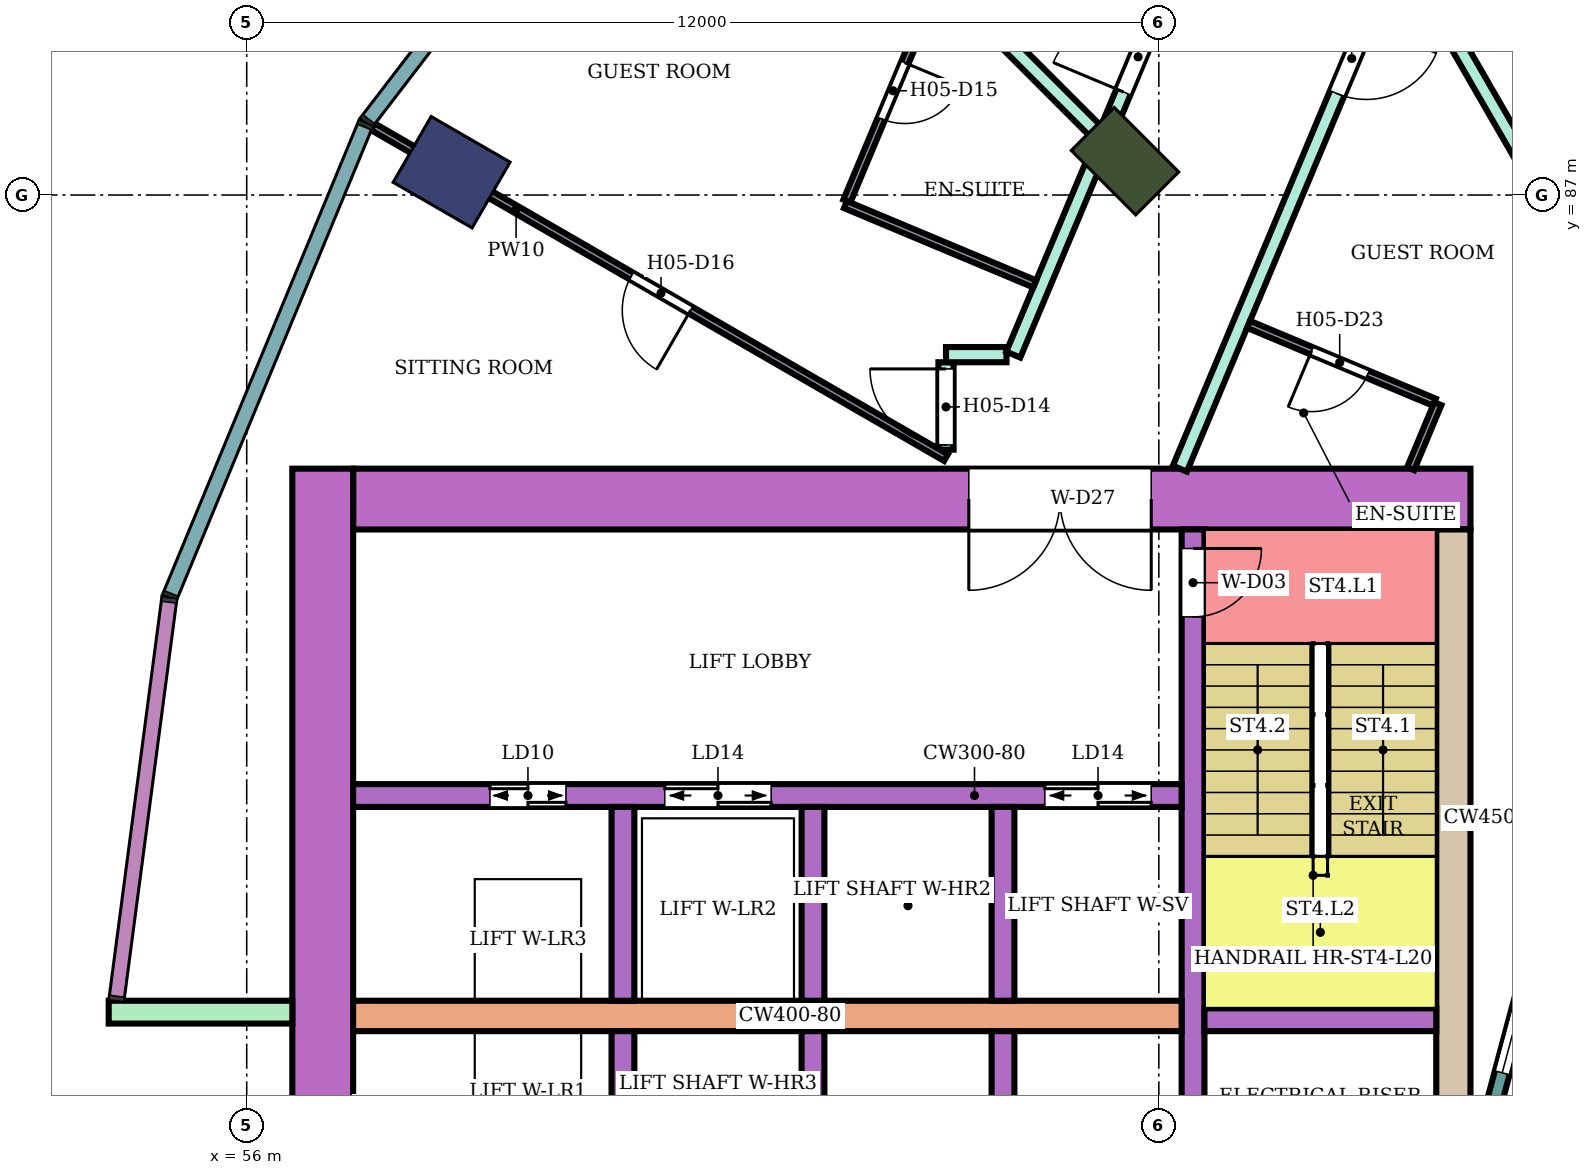
"""IFC4 building model, lengths in metres.
Left out: names, types, materials, properties, quantities, classifications, styles, units other than length and angle.
Written with IfcOpenShell. Run it as: python <this file> out.ifc"""

import sys

from ifc_helpers import new_model, si_unit, direction, frame, frame_2d, origin, origin_2d, place, context, subcontext, project, spatial, rectangle, extrude, element, fill, save


model = new_model("IFC4")
c1 = context("Model", 3, precision=1e-05, world=origin(), true_north=direction((0.0, 1.0)))
c2 = subcontext(c1, "Body", "Model", "MODEL_VIEW")
j1 = project(units=[si_unit("LENGTHUNIT", "METRE"), si_unit("PLANEANGLEUNIT", "RADIAN")], contexts=[c1])
p1 = place(None, origin())
s1 = spatial("IfcSite", under=j1, at=p1, CompositionType="ELEMENT")
p2 = place(p1, origin())
s2 = spatial("IfcBuilding", under=s1, at=p2, CompositionType="ELEMENT")
p3 = place(p2, frame((0.0, 0.0, 90.0)))
s3 = spatial("IfcBuildingStorey", under=s2, at=p3, CompositionType="ELEMENT", Elevation=90.0)
p4 = place(p3, frame((58.696, 87.3, 0.0), z_axis=(0.0, 0.0, 1.0), x_axis=(-0.866025403784, 0.5, 0.0)))
e1 = element("IfcColumn", 1, at=p4, inside=s3, PredefinedType="COLUMN", context=c2, shape_type="SweptSolid", body=[
    extrude(rectangle(XDim=1.2, YDim=1.0, at=origin_2d()), origin(), (0.0, 0.0, 1.0), 3.8),
])
p5 = place(p3, frame((67.555, 87.445, 0.0), z_axis=(0.0, 0.0, 1.0), x_axis=(-0.707106781187, 0.707106781187, 0.0)))
e2 = element("IfcColumn", 2, at=p5, inside=s3, PredefinedType="COLUMN", context=c2, shape_type="SweptSolid", body=[
    extrude(rectangle(XDim=1.2, YDim=0.8, at=origin_2d()), origin(), (0.0, 0.0, 1.0), 3.8),
])
p6 = place(p3, frame((72.1, 83.0, 0.0), z_axis=(0.0, 0.0, 1.0), x_axis=(-1.0, 0.0, 0.0)))
e3 = element("IfcWall", 3, at=p6, inside=s3, PredefinedType="SHEAR", context=c2, shape_type="SweptSolid", body=[
    extrude(rectangle(XDim=14.7, YDim=0.8, at=frame_2d((7.35, 0.0))), origin(), (0.0, 0.0, 1.0), 3.48),
])
p7 = place(p6, frame((4.2, 0.0, 0.0)))
e4 = element("IfcOpeningElement", 4, at=p7, cuts=e3, PredefinedType="OPENING", context=c2, shape_type="SweptSolid", body=[
    extrude(rectangle(XDim=2.4, YDim=2.4, at=frame_2d((1.2, 1.2))), frame((0.0, 0.41, 0.0), z_axis=(0.0, -1.0, 0.0), x_axis=(1.0, 0.0, 0.0)), (0.0, 0.0, 1.0), 0.82),
])
p8 = place(p3, frame((71.875, 82.6, 0.0), z_axis=(0.0, 0.0, 1.0), x_axis=(0.0, -1.0, 0.0)))
e5 = element("IfcWall", 5, at=p8, inside=s3, PredefinedType="SHEAR", context=c2, shape_type="SweptSolid", body=[
    extrude(rectangle(XDim=7.6, YDim=0.45, at=frame_2d((3.8, 0.0))), origin(), (0.0, 0.0, 1.0), 3.48),
])
p9 = place(p3, frame((57.0, 83.4, 0.0), z_axis=(0.0, 0.0, 1.0), x_axis=(0.0, -1.0, 0.0)))
e6 = element("IfcWall", 6, at=p9, inside=s3, PredefinedType="SHEAR", context=c2, shape_type="SweptSolid", body=[
    extrude(rectangle(XDim=16.8, YDim=0.8, at=frame_2d((8.4, 0.0))), origin(), (0.0, 0.0, 1.0), 3.48),
])
p10 = place(p3, frame((68.45, 82.6, 0.0), z_axis=(0.0, 0.0, 1.0), x_axis=(0.0, -1.0, 0.0)))
e7 = element("IfcWall", 7, at=p10, inside=s3, PredefinedType="SHEAR", context=c2, shape_type="SweptSolid", body=[
    extrude(rectangle(XDim=7.6, YDim=0.3, at=frame_2d((3.8, 0.0))), origin(), (0.0, 0.0, 1.0), 3.48),
])
p11 = place(p10, frame((0.25, 0.0, 0.0)))
e8 = element("IfcOpeningElement", 8, at=p11, cuts=e7, PredefinedType="OPENING", context=c2, shape_type="SweptSolid", body=[
    extrude(rectangle(XDim=0.9, YDim=2.1, at=frame_2d((0.45, 1.05))), frame((0.0, 0.16, 0.0), z_axis=(0.0, -1.0, 0.0), x_axis=(1.0, 0.0, 0.0)), (0.0, 0.0, 1.0), 0.32),
])
p12 = place(p3, frame((71.65, 76.15, 0.0), z_axis=(0.0, 0.0, 1.0), x_axis=(-1.0, 0.0, 0.0)))
e9 = element("IfcWall", 9, at=p12, inside=s3, PredefinedType="SHEAR", context=c2, shape_type="SweptSolid", body=[
    extrude(rectangle(XDim=3.05, YDim=0.3, at=frame_2d((1.525, 0.0))), origin(), (0.0, 0.0, 1.0), 3.48),
])
p13 = place(p3, frame((68.3, 76.2, 0.0), z_axis=(0.0, 0.0, 1.0), x_axis=(-1.0, 0.0, 0.0)))
e10 = element("IfcWall", 10, at=p13, inside=s3, PredefinedType="SHEAR", context=c2, shape_type="SweptSolid", body=[
    extrude(rectangle(XDim=10.9, YDim=0.4, at=frame_2d((5.45, 0.0))), origin(), (0.0, 0.0, 1.0), 3.48),
])
p14 = place(p3, frame((68.3, 79.1, 0.0), z_axis=(0.0, 0.0, 1.0), x_axis=(-1.0, 0.0, 0.0)))
e11 = element("IfcWall", 11, at=p14, inside=s3, PredefinedType="SHEAR", context=c2, shape_type="SweptSolid", body=[
    extrude(rectangle(XDim=10.9, YDim=0.3, at=frame_2d((5.45, 0.0))), origin(), (0.0, 0.0, 1.0), 3.48),
])
p15 = place(p14, frame((0.4, 0.0, 0.0)))
e12 = element("IfcOpeningElement", 12, at=p15, cuts=e11, PredefinedType="OPENING", context=c2, shape_type="SweptSolid", body=[
    extrude(rectangle(XDim=1.4, YDim=2.1, at=frame_2d((0.7, 1.05))), frame((0.0, 0.16, 0.0), z_axis=(0.0, -1.0, 0.0), x_axis=(1.0, 0.0, 0.0)), (0.0, 0.0, 1.0), 0.32),
])
p16 = place(p14, frame((5.4, 0.0, 0.0)))
e13 = element("IfcOpeningElement", 13, at=p16, cuts=e11, PredefinedType="OPENING", context=c2, shape_type="SweptSolid", body=[
    extrude(rectangle(XDim=1.4, YDim=2.1, at=frame_2d((0.7, 1.05))), frame((0.0, 0.16, 0.0), z_axis=(0.0, -1.0, 0.0), x_axis=(1.0, 0.0, 0.0)), (0.0, 0.0, 1.0), 0.32),
])
p17 = place(p14, frame((8.1, 0.0, 0.0)))
e14 = element("IfcOpeningElement", 14, at=p17, cuts=e11, PredefinedType="OPENING", context=c2, shape_type="SweptSolid", body=[
    extrude(rectangle(XDim=1.0, YDim=2.1, at=frame_2d((0.5, 1.05))), frame((0.0, 0.16, 0.0), z_axis=(0.0, -1.0, 0.0), x_axis=(1.0, 0.0, 0.0)), (0.0, 0.0, 1.0), 0.32),
])
for number, where, z_axis, x_axis in (
    (15, (65.95, 76.0, 0.0), (0.0, 0.0, 1.0), (0.0, -1.0, 0.0)),
    (16, (63.45, 76.0, 0.0), (0.0, 0.0, 1.0), (0.0, -1.0, 0.0)),
    (17, (60.95, 76.0, 0.0), (0.0, 0.0, 1.0), (0.0, -1.0, 0.0)),
    (18, (65.95, 78.95, 0.0), (0.0, 0.0, 1.0), (0.0, -1.0, 0.0)),
    (19, (63.45, 78.95, 0.0), (0.0, 0.0, 1.0), (0.0, -1.0, 0.0)),
    (20, (60.95, 78.95, 0.0), (0.0, 0.0, 1.0), (0.0, -1.0, 0.0)),
):
    element("IfcWall", number, at=place(p3, frame(where, z_axis=z_axis, x_axis=x_axis)), inside=s3, PredefinedType="SHEAR", context=c2, shape_type="SweptSolid", body=[
        extrude(rectangle(XDim=2.55, YDim=0.3, at=frame_2d((1.275, 0.0))), origin(), (0.0, 0.0, 1.0), 3.48),
    ])
p18 = place(p3, frame((56.6, 76.25, 0.0), z_axis=(0.0, 0.0, 1.0), x_axis=(-1.0, 0.0, 0.0)))
e21 = element("IfcWall", 21, at=p18, inside=s3, PredefinedType="NOTDEFINED", context=c2, shape_type="SweptSolid", body=[
    extrude(rectangle(XDim=2.416, YDim=0.3, at=frame_2d((1.208, 0.0))), origin(), (0.0, 0.0, 1.0), 3.8),
])
p19 = place(p3, frame((73.415, 78.802, 0.0), z_axis=(0.0, 0.0, 1.0), x_axis=(-0.258789828301, -0.965933654434, 0.0)))
e22 = element("IfcWall", 22, at=p19, inside=s3, PredefinedType="NOTDEFINED", context=c2, shape_type="SweptSolid", body=[
    extrude(rectangle(XDim=3.936, YDim=0.2, at=frame_2d((1.968, 0.0))), origin(), (0.0, 0.0, 1.0), 3.8),
])
p20 = place(p19, frame((0.468, 0.0, 0.9)))
e23 = element("IfcOpeningElement", 23, at=p20, cuts=e22, PredefinedType="OPENING", context=c2, shape_type="SweptSolid", body=[
    extrude(rectangle(XDim=3.0, YDim=2.3, at=frame_2d((1.5, 1.15))), frame((0.0, 0.11, 0.0), z_axis=(0.0, -1.0, 0.0), x_axis=(1.0, 0.0, 0.0)), (0.0, 0.0, 1.0), 0.22),
])
p21 = place(p3, frame((63.6, 91.409, 0.0), z_axis=(0.0, 0.0, 1.0), x_axis=(0.70693749829, -0.707276023566, 0.0)))
e24 = element("IfcWall", 24, at=p21, inside=s3, PredefinedType="PARTITIONING", context=c2, shape_type="SweptSolid", body=[
    extrude(rectangle(XDim=5.048, YDim=0.2, at=frame_2d((2.524, 0.0))), origin(), (0.0, 0.0, 1.0), 3.35),
])
p22 = place(p3, frame((65.2, 83.65, 0.0), z_axis=(0.0, 0.0, 1.0), x_axis=(0.0, 1.0, 0.0)))
e25 = element("IfcWall", 25, at=p22, inside=s3, PredefinedType="PARTITIONING", context=c2, shape_type="SweptSolid", body=[
    extrude(rectangle(XDim=1.15, YDim=0.2, at=frame_2d((0.575, 0.0))), origin(), (0.0, 0.0, 1.0), 3.35),
])
p23 = place(p22, frame((0.062, 0.0, 0.0)))
e26 = element("IfcOpeningElement", 26, at=p23, cuts=e25, PredefinedType="OPENING", context=c2, shape_type="SweptSolid", body=[
    extrude(rectangle(XDim=1.0, YDim=2.1, at=frame_2d((0.5, 1.05))), frame((0.0, 0.11, 0.0), z_axis=(0.0, -1.0, 0.0), x_axis=(1.0, 0.0, 0.0)), (0.0, 0.0, 1.0), 0.22),
])
p24 = place(p3, frame((65.2, 84.9, 0.0), z_axis=(0.0, 0.0, 1.0), x_axis=(1.0, 0.0, 0.0)))
e27 = element("IfcWall", 27, at=p24, inside=s3, PredefinedType="PARTITIONING", context=c2, shape_type="SweptSolid", body=[
    extrude(rectangle(XDim=0.796, YDim=0.2, at=frame_2d((0.398, 0.0))), origin(), (0.0, 0.0, 1.0), 3.35),
])
p25 = place(p3, frame((66.085, 84.9, 0.0), z_axis=(0.0, 0.0, 1.0), x_axis=(0.386676248006, 0.922215527536, 0.0)))
e28 = element("IfcWall", 28, at=p25, inside=s3, PredefinedType="PARTITIONING", context=c2, shape_type="SweptSolid", body=[
    extrude(rectangle(XDim=8.5, YDim=0.2, at=frame_2d((4.25, 0.0))), origin(), (0.0, 0.0, 1.0), 3.35),
])
p26 = place(p25, frame((3.748, 0.0, 0.0)))
e29 = element("IfcOpeningElement", 29, at=p26, cuts=e28, PredefinedType="OPENING", context=c2, shape_type="SweptSolid", body=[
    extrude(rectangle(XDim=1.0, YDim=2.1, at=frame_2d((0.5, 1.05))), frame((0.0, 0.11, 0.0), z_axis=(0.0, -1.0, 0.0), x_axis=(1.0, 0.0, 0.0)), (0.0, 0.0, 1.0), 0.22),
])
p27 = place(p3, frame((68.277, 83.4, 0.0), z_axis=(0.0, 0.0, 1.0), x_axis=(0.386454861164, 0.922308321703, 0.0)))
e30 = element("IfcWall", 30, at=p27, inside=s3, PredefinedType="PARTITIONING", context=c2, shape_type="SweptSolid", body=[
    extrude(rectangle(XDim=7.762, YDim=0.2, at=frame_2d((3.881, 0.0))), origin(), (0.0, 0.0, 1.0), 3.35),
])
p28 = place(p27, frame((5.351, 0.0, 0.0)))
e31 = element("IfcOpeningElement", 31, at=p28, cuts=e30, PredefinedType="OPENING", context=c2, shape_type="SweptSolid", body=[
    extrude(rectangle(XDim=1.0, YDim=2.1, at=frame_2d((0.5, 1.05))), frame((0.0, 0.11, 0.0), z_axis=(0.0, -1.0, 0.0), x_axis=(1.0, 0.0, 0.0)), (0.0, 0.0, 1.0), 0.22),
])
p29 = place(p3, frame((71.264, 90.135, 0.0), z_axis=(0.0, 0.0, 1.0), x_axis=(0.499791624077, -0.866145676259, 0.0)))
e32 = element("IfcWall", 32, at=p29, inside=s3, PredefinedType="PARTITIONING", context=c2, shape_type="SweptSolid", body=[
    extrude(rectangle(XDim=9.778, YDim=0.2, at=frame_2d((4.889, 0.0))), origin(), (0.0, 0.0, 1.0), 3.35),
])
p30 = place(p3, frame((57.659, 87.899, 0.0), z_axis=(0.0, 0.0, 1.0), x_axis=(0.86602264145, -0.500004784474, 0.0)))
e33 = element("IfcWall", 33, at=p30, inside=s3, PredefinedType="PARTITIONING", context=c2, shape_type="SweptSolid", body=[
    extrude(rectangle(XDim=8.708, YDim=0.1, at=frame_2d((4.354, 0.0))), origin(), (0.0, 0.0, 1.0), 3.35),
])
p31 = place(p30, frame((3.929, 0.0, 0.0)))
e34 = element("IfcOpeningElement", 34, at=p31, cuts=e33, PredefinedType="OPENING", context=c2, shape_type="SweptSolid", body=[
    extrude(rectangle(XDim=0.9, YDim=2.1, at=frame_2d((0.45, 1.05))), frame((0.0, 0.06, 0.0), z_axis=(0.0, -1.0, 0.0), x_axis=(1.0, 0.0, 0.0)), (0.0, 0.0, 1.0), 0.12),
])
p32 = place(p3, frame((63.896, 86.92, 0.0), z_axis=(0.0, 0.0, 1.0), x_axis=(0.386485049699, 0.922295671875, 0.0)))
e35 = element("IfcWall", 35, at=p32, inside=s3, PredefinedType="PARTITIONING", context=c2, shape_type="SweptSolid", body=[
    extrude(rectangle(XDim=3.077, YDim=0.1, at=frame_2d((1.539, 0.0))), origin(), (0.0, 0.0, 1.0), 3.35),
])
p33 = place(p32, frame((1.174, 0.0, 0.0)))
e36 = element("IfcOpeningElement", 36, at=p33, cuts=e35, PredefinedType="OPENING", context=c2, shape_type="SweptSolid", body=[
    extrude(rectangle(XDim=0.8, YDim=2.1, at=frame_2d((0.4, 1.05))), frame((0.0, 0.06, 0.0), z_axis=(0.0, -1.0, 0.0), x_axis=(1.0, 0.0, 0.0)), (0.0, 0.0, 1.0), 0.12),
])
p34 = place(p3, frame((63.877, 86.874, 0.0), z_axis=(0.0, 0.0, 1.0), x_axis=(0.922350337209, -0.386354572188, 0.0)))
e37 = element("IfcWall", 37, at=p34, inside=s3, PredefinedType="PARTITIONING", context=c2, shape_type="SweptSolid", body=[
    extrude(rectangle(XDim=2.7, YDim=0.1, at=frame_2d((1.35, 0.0))), origin(), (0.0, 0.0, 1.0), 3.35),
])
p35 = place(p3, frame((69.181, 85.298, 0.0), z_axis=(0.0, 0.0, 1.0), x_axis=(0.922377635784, -0.38628939541, 0.0)))
e38 = element("IfcWall", 38, at=p35, inside=s3, PredefinedType="PARTITIONING", context=c2, shape_type="SweptSolid", body=[
    extrude(rectangle(XDim=2.65, YDim=0.1, at=frame_2d((1.325, 0.0))), origin(), (0.0, 0.0, 1.0), 3.35),
])
p36 = place(p35, frame((0.9, 0.0, 0.0)))
e39 = element("IfcOpeningElement", 39, at=p36, cuts=e38, PredefinedType="OPENING", context=c2, shape_type="SweptSolid", body=[
    extrude(rectangle(XDim=0.8, YDim=2.1, at=frame_2d((0.4, 1.05))), frame((0.0, 0.06, 0.0), z_axis=(0.0, -1.0, 0.0), x_axis=(1.0, 0.0, 0.0)), (0.0, 0.0, 1.0), 0.12),
])
p37 = place(p3, frame((71.313, 83.4, 0.0), z_axis=(0.0, 0.0, 1.0), x_axis=(0.386148512695, 0.922436624459, 0.0)))
e40 = element("IfcWall", 40, at=p37, inside=s3, PredefinedType="PARTITIONING", context=c2, shape_type="SweptSolid", body=[
    extrude(rectangle(XDim=0.927, YDim=0.1, at=frame_2d((0.463, 0.0))), origin(), (0.0, 0.0, 1.0), 3.35),
])
p38 = place(p20, origin())
e41 = element("IfcWindow", 41, at=p38, inside=s3, PartitioningType="SINGLE_PANEL", PredefinedType="WINDOW", context=c2, shape_type="SweptSolid", body=[
    extrude(rectangle(XDim=3.0, YDim=2.3, at=frame_2d((1.5, 1.15))), frame((0.0, 0.03, 0.0), z_axis=(0.0, -1.0, 0.0), x_axis=(1.0, 0.0, 0.0)), (0.0, 0.0, 1.0), 0.06),
])
fill(e23, e41)
p39 = place(p26, origin())
e42 = element("IfcDoor", 42, at=p39, inside=s3, OperationType="SINGLE_SWING_LEFT", PredefinedType="DOOR", context=c2, shape_type="SweptSolid", body=[
    extrude(rectangle(XDim=1.0, YDim=2.1, at=frame_2d((0.5, 1.05))), frame((0.0, 0.025, 0.0), z_axis=(0.0, -1.0, 0.0), x_axis=(1.0, 0.0, 0.0)), (0.0, 0.0, 1.0), 0.05),
])
fill(e29, e42)
p40 = place(p23, origin())
e43 = element("IfcDoor", 43, at=p40, inside=s3, OperationType="SINGLE_SWING_RIGHT", PredefinedType="DOOR", context=c2, shape_type="SweptSolid", body=[
    extrude(rectangle(XDim=1.0, YDim=2.1, at=frame_2d((0.5, 1.05))), frame((0.0, 0.025, 0.0), z_axis=(0.0, -1.0, 0.0), x_axis=(1.0, 0.0, 0.0)), (0.0, 0.0, 1.0), 0.05),
])
fill(e26, e43)
p41 = place(p33, frame((0.8, 0.0, 0.0), z_axis=(0.0, 0.0, 1.0), x_axis=(-1.0, 0.0, 0.0)))
e44 = element("IfcDoor", 44, at=p41, inside=s3, OperationType="SINGLE_SWING_LEFT", PredefinedType="DOOR", context=c2, shape_type="SweptSolid", body=[
    extrude(rectangle(XDim=0.8, YDim=2.1, at=frame_2d((0.4, 1.05))), frame((0.0, 0.025, 0.0), z_axis=(0.0, -1.0, 0.0), x_axis=(1.0, 0.0, 0.0)), (0.0, 0.0, 1.0), 0.05),
])
fill(e36, e44)
p42 = place(p31, frame((0.9, 0.0, 0.0), z_axis=(0.0, 0.0, 1.0), x_axis=(-1.0, 0.0, 0.0)))
e45 = element("IfcDoor", 45, at=p42, inside=s3, OperationType="SINGLE_SWING_LEFT", PredefinedType="DOOR", context=c2, shape_type="SweptSolid", body=[
    extrude(rectangle(XDim=0.9, YDim=2.1, at=frame_2d((0.45, 1.05))), frame((0.0, 0.025, 0.0), z_axis=(0.0, -1.0, 0.0), x_axis=(1.0, 0.0, 0.0)), (0.0, 0.0, 1.0), 0.05),
])
fill(e34, e45)
p43 = place(p28, frame((1.0, 0.0, 0.0), z_axis=(0.0, 0.0, 1.0), x_axis=(-1.0, 0.0, 0.0)))
e46 = element("IfcDoor", 46, at=p43, inside=s3, OperationType="SINGLE_SWING_LEFT", PredefinedType="DOOR", context=c2, shape_type="SweptSolid", body=[
    extrude(rectangle(XDim=1.0, YDim=2.1, at=frame_2d((0.5, 1.05))), frame((0.0, 0.025, 0.0), z_axis=(0.0, -1.0, 0.0), x_axis=(1.0, 0.0, 0.0)), (0.0, 0.0, 1.0), 0.05),
])
fill(e31, e46)
p44 = place(p36, frame((0.8, 0.0, 0.0), z_axis=(0.0, 0.0, 1.0), x_axis=(-1.0, 0.0, 0.0)))
e47 = element("IfcDoor", 47, at=p44, inside=s3, OperationType="SINGLE_SWING_RIGHT", PredefinedType="DOOR", context=c2, shape_type="SweptSolid", body=[
    extrude(rectangle(XDim=0.8, YDim=2.1, at=frame_2d((0.4, 1.05))), frame((0.0, 0.025, 0.0), z_axis=(0.0, -1.0, 0.0), x_axis=(1.0, 0.0, 0.0)), (0.0, 0.0, 1.0), 0.05),
])
fill(e39, e47)
p45 = place(p11, origin())
e48 = element("IfcDoor", 48, at=p45, inside=s3, OperationType="SINGLE_SWING_LEFT", PredefinedType="DOOR", context=c2, shape_type="SweptSolid", body=[
    extrude(rectangle(XDim=0.9, YDim=2.1, at=frame_2d((0.45, 1.05))), frame((0.0, 0.025, 0.0), z_axis=(0.0, -1.0, 0.0), x_axis=(1.0, 0.0, 0.0)), (0.0, 0.0, 1.0), 0.05),
])
fill(e8, e48)
p46 = place(p15, origin())
e49 = element("IfcDoor", 49, at=p46, inside=s3, OperationType="DOUBLE_DOOR_SLIDING", PredefinedType="DOOR", context=c2, shape_type="SweptSolid", body=[
    extrude(rectangle(XDim=1.4, YDim=2.1, at=frame_2d((0.7, 1.05))), frame((0.0, 0.025, 0.0), z_axis=(0.0, -1.0, 0.0), x_axis=(1.0, 0.0, 0.0)), (0.0, 0.0, 1.0), 0.05),
])
fill(e12, e49)
p47 = place(p16, origin())
e50 = element("IfcDoor", 50, at=p47, inside=s3, OperationType="DOUBLE_DOOR_SLIDING", PredefinedType="DOOR", context=c2, shape_type="SweptSolid", body=[
    extrude(rectangle(XDim=1.4, YDim=2.1, at=frame_2d((0.7, 1.05))), frame((0.0, 0.025, 0.0), z_axis=(0.0, -1.0, 0.0), x_axis=(1.0, 0.0, 0.0)), (0.0, 0.0, 1.0), 0.05),
])
fill(e13, e50)
p48 = place(p17, origin())
e51 = element("IfcDoor", 51, at=p48, inside=s3, OperationType="DOUBLE_DOOR_SLIDING", PredefinedType="DOOR", context=c2, shape_type="SweptSolid", body=[
    extrude(rectangle(XDim=1.0, YDim=2.1, at=frame_2d((0.5, 1.05))), frame((0.0, 0.025, 0.0), z_axis=(0.0, -1.0, 0.0), x_axis=(1.0, 0.0, 0.0)), (0.0, 0.0, 1.0), 0.05),
])
fill(e14, e51)
p49 = place(p7, origin())
e52 = element("IfcDoor", 52, at=p49, inside=s3, OperationType="DOUBLE_DOOR_SINGLE_SWING", PredefinedType="DOOR", context=c2, shape_type="SweptSolid", body=[
    extrude(rectangle(XDim=2.4, YDim=2.4, at=frame_2d((1.2, 1.2))), frame((0.0, 0.025, 0.0), z_axis=(0.0, -1.0, 0.0), x_axis=(1.0, 0.0, 0.0)), (0.0, 0.0, 1.0), 0.05),
])
fill(e4, e52)
save(model, sys.argv[1])
